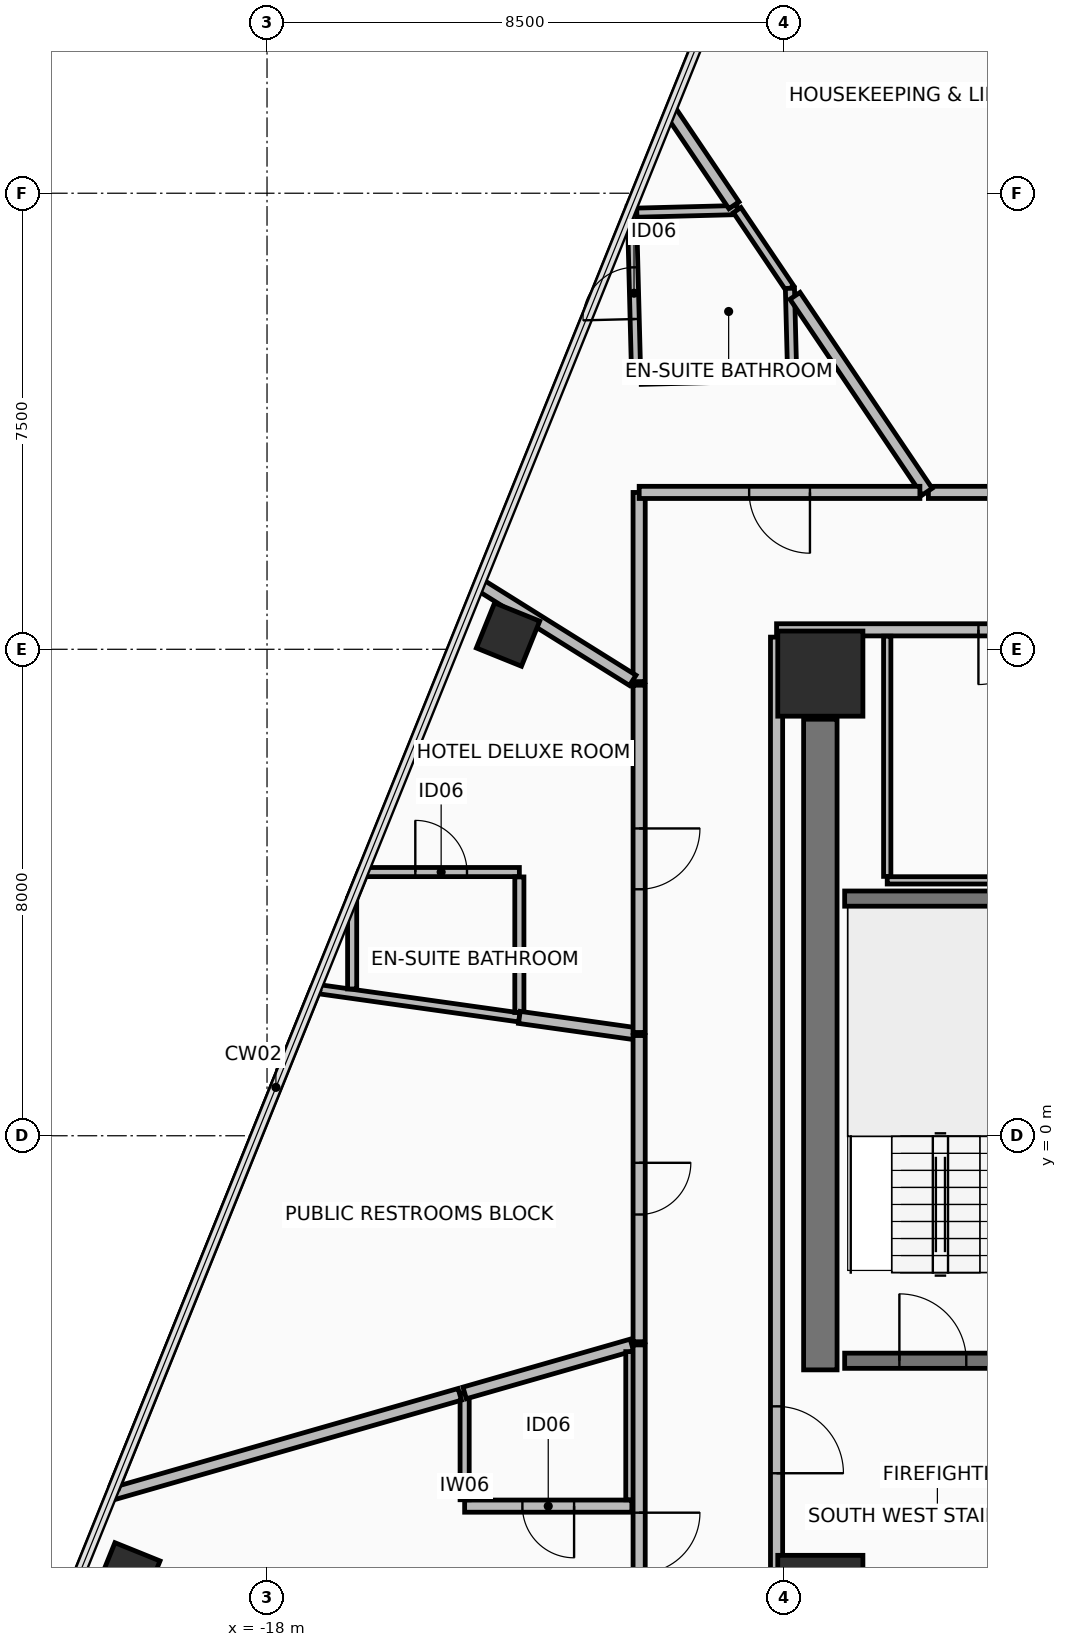
"""IFC4 building model, lengths in metres.
Left out: names, types, materials, properties, quantities, classifications, styles, units other than length and angle.
Written with IfcOpenShell. Run it as: python <this file> out.ifc"""

import sys

from ifc_helpers import new_model, si_unit, direction, frame, frame_2d, origin, origin_2d, place, context, subcontext, project, spatial, rectangle, hollow_rectangle, extrude, element, fill, save


model = new_model("IFC4")
c1 = context("Model", 3, precision=1e-05, world=origin(), true_north=direction((0.0, 1.0)))
c2 = subcontext(c1, "Body", "Model", "MODEL_VIEW")
j1 = project(units=[si_unit("LENGTHUNIT", "METRE"), si_unit("PLANEANGLEUNIT", "RADIAN")], contexts=[c1])
p1 = place(None, origin())
s1 = spatial("IfcSite", under=j1, at=p1, CompositionType="ELEMENT")
p2 = place(p1, origin())
s2 = spatial("IfcBuilding", under=s1, at=p2, CompositionType="ELEMENT")
p3 = place(p2, frame((0.0, 0.0, 60.45)))
s3 = spatial("IfcBuildingStorey", under=s2, at=p3, CompositionType="ELEMENT", Elevation=60.45)
for number, where, z_axis, x_axis in (
    (1, (-8.9, -7.6, 0.0), (0.0, 0.0, 1.0), (1.0, 0.0, 0.0)),
    (2, (-8.9, 7.6, 0.0), (0.0, 0.0, 1.0), (1.0, 0.0, 0.0)),
):
    element("IfcColumn", number, at=place(p3, frame(where, z_axis=z_axis, x_axis=x_axis)), inside=s3, PredefinedType="COLUMN", context=c2, shape_type="SweptSolid", body=[
        extrude(rectangle(XDim=1.4, YDim=1.4, at=origin_2d()), origin(), (0.0, 0.0, 1.0), 3.4),
    ])
for number, where, z_axis, x_axis in (
    (3, (-14.036, 8.242, 0.0), (0.0, 0.0, 1.0), (0.375, 0.927, 0.0)),
    (4, (-20.281, -7.213, 0.0), (0.0, 0.0, 1.0), (0.375, 0.927, 0.0)),
):
    element("IfcColumn", number, at=place(p3, frame(where, z_axis=z_axis, x_axis=x_axis)), inside=s3, PredefinedType="COLUMN", context=c2, shape_type="SweptSolid", body=[
        extrude(hollow_rectangle(XDim=0.8, YDim=0.8, WallThickness=0.045, at=origin_2d()), origin(), (0.0, 0.0, 1.0), 3.4),
    ])
p4 = place(p3, frame((-8.9, -3.85, 0.0), z_axis=(0.0, 0.0, 1.0), x_axis=(0.0, 1.0, 0.0)))
e5 = element("IfcWall", 5, at=p4, inside=s3, PredefinedType="SHEAR", context=c2, shape_type="SweptSolid", body=[
    extrude(rectangle(XDim=10.7, YDim=0.55, at=frame_2d((5.35, 0.0))), origin(), (0.0, 0.0, 1.0), 3.225),
])
p5 = place(p3, frame((9.62, 8.32, 0.0), z_axis=(0.0, 0.0, 1.0), x_axis=(-1.0, 0.0, 0.0)))
e6 = element("IfcWall", 6, at=p5, inside=s3, PredefinedType="PARTITIONING", context=c2, shape_type="SweptSolid", body=[
    extrude(rectangle(XDim=19.24, YDim=0.2, at=frame_2d((9.62, 0.0))), origin(), (0.0, 0.0, 1.0), 2.57),
])
p6 = place(p5, frame((15.02, 0.0, 0.0)))
e7 = element("IfcOpeningElement", 7, at=p6, cuts=e6, PredefinedType="OPENING", context=c2, shape_type="SweptSolid", body=[
    extrude(rectangle(XDim=0.9, YDim=2.1, at=frame_2d((0.45, 1.05))), frame((0.0, 0.11, 0.0), z_axis=(0.0, -1.0, 0.0), x_axis=(1.0, 0.0, 0.0)), (0.0, 0.0, 1.0), 0.22),
])
p7 = place(p3, frame((-9.62, 8.2, 0.0), z_axis=(0.0, 0.0, 1.0), x_axis=(0.0, -1.0, 0.0)))
e8 = element("IfcWall", 8, at=p7, inside=s3, PredefinedType="PARTITIONING", context=c2, shape_type="SweptSolid", body=[
    extrude(rectangle(XDim=16.4, YDim=0.2, at=frame_2d((8.2, 0.0))), origin(), (0.0, 0.0, 1.0), 2.62),
])
p8 = place(p7, frame((12.65, 0.0, 0.0)))
e9 = element("IfcOpeningElement", 9, at=p8, cuts=e8, PredefinedType="OPENING", context=c2, shape_type="SweptSolid", body=[
    extrude(rectangle(XDim=1.1, YDim=2.15, at=frame_2d((0.55, 1.075))), frame((0.0, 0.11, 0.0), z_axis=(0.0, -1.0, 0.0), x_axis=(1.0, 0.0, 0.0)), (0.0, 0.0, 1.0), 0.22),
])
p9 = place(p3, frame((-8.5, -3.7, 0.0), z_axis=(0.0, 0.0, 1.0), x_axis=(1.0, 0.0, 0.0)))
e10 = element("IfcWall", 10, at=p9, inside=s3, PredefinedType="SHEAR", context=c2, shape_type="SweptSolid", body=[
    extrude(rectangle(XDim=2.95, YDim=0.25, at=frame_2d((1.475, 0.0))), origin(), (0.0, 0.0, 1.0), 3.225),
])
p10 = place(p9, frame((0.9, 0.0, 0.0)))
e11 = element("IfcOpeningElement", 11, at=p10, cuts=e10, PredefinedType="OPENING", context=c2, shape_type="SweptSolid", body=[
    extrude(rectangle(XDim=1.1, YDim=2.15, at=frame_2d((0.55, 1.075))), frame((0.0, 0.135, 0.0), z_axis=(0.0, -1.0, 0.0), x_axis=(1.0, 0.0, 0.0)), (0.0, 0.0, 1.0), 0.27),
])
p11 = place(p3, frame((-8.5, 3.9, 0.0), z_axis=(0.0, 0.0, 1.0), x_axis=(1.0, 0.0, 0.0)))
e12 = element("IfcWall", 12, at=p11, inside=s3, PredefinedType="SHEAR", context=c2, shape_type="SweptSolid", body=[
    extrude(rectangle(XDim=2.95, YDim=0.25, at=frame_2d((1.475, 0.0))), origin(), (0.0, 0.0, 1.0), 3.225),
])
p12 = place(p3, frame((-7.8, 4.2, 0.0), z_axis=(0.0, 0.0, 1.0), x_axis=(1.0, 0.0, 0.0)))
e13 = element("IfcWall", 13, at=p12, inside=s3, PredefinedType="PARTITIONING", context=c2, shape_type="SweptSolid", body=[
    extrude(rectangle(XDim=3.9, YDim=0.12, at=frame_2d((1.95, 0.0))), origin(), (0.0, 0.0, 1.0), 3.225),
])
p13 = place(p3, frame((-7.8, 8.215, 0.0), z_axis=(0.0, 0.0, 1.0), x_axis=(0.0, -1.0, 0.0)))
e14 = element("IfcWall", 14, at=p13, inside=s3, PredefinedType="PARTITIONING", context=c2, shape_type="SweptSolid", body=[
    extrude(rectangle(XDim=3.95, YDim=0.12, at=frame_2d((1.975, 0.0))), origin(), (0.0, 0.0, 1.0), 2.42),
])
p14 = place(p3, frame((-11.927, 12.429, 0.0), z_axis=(0.0, 0.0, 1.0), x_axis=(-0.025753181092, 0.99966833183, 0.0)))
e15 = element("IfcWall", 15, at=p14, inside=s3, PredefinedType="PARTITIONING", context=c2, shape_type="SweptSolid", body=[
    extrude(rectangle(XDim=2.854, YDim=0.15, at=frame_2d((1.427, 0.0))), origin(), (0.0, 0.0, 1.0), 2.42),
])
p15 = place(p14, frame((1.002, 0.0, 0.0)))
e16 = element("IfcOpeningElement", 16, at=p15, cuts=e15, PredefinedType="OPENING", context=c2, shape_type="SweptSolid", body=[
    extrude(rectangle(XDim=0.85, YDim=2.1, at=frame_2d((0.425, 1.05))), frame((0.0, 0.085, 0.0), z_axis=(0.0, -1.0, 0.0), x_axis=(1.0, 0.0, 0.0)), (0.0, 0.0, 1.0), 0.17),
])
p16 = place(p3, frame((-11.918, 15.18, 0.0), z_axis=(0.0, 0.0, 1.0), x_axis=(0.999668899852, 0.02573112257, 0.0)))
e17 = element("IfcWall", 17, at=p16, inside=s3, PredefinedType="PARTITIONING", context=c2, shape_type="SweptSolid", body=[
    extrude(rectangle(XDim=1.651, YDim=0.15, at=frame_2d((0.825, 0.0))), origin(), (0.0, 0.0, 1.0), 2.42),
])
p17 = place(p3, frame((-10.268, 15.223, 0.0), z_axis=(0.0, 0.0, 1.0), x_axis=(0.559229675695, -0.82901276819, 0.0)))
e18 = element("IfcWall", 18, at=p17, inside=s3, PredefinedType="PARTITIONING", context=c2, shape_type="SweptSolid", body=[
    extrude(rectangle(XDim=1.552, YDim=0.15, at=frame_2d((0.776, 0.0))), origin(), (0.0, 0.0, 1.0), 3.225),
])
p18 = place(p3, frame((-9.4, 13.936, 0.0), z_axis=(0.0, 0.0, 1.0), x_axis=(0.025745445057, -0.999668531094, 0.0)))
e19 = element("IfcWall", 19, at=p18, inside=s3, PredefinedType="PARTITIONING", context=c2, shape_type="SweptSolid", body=[
    extrude(rectangle(XDim=1.441, YDim=0.15, at=frame_2d((0.721, 0.0))), origin(), (0.0, 0.0, 1.0), 3.225),
])
p19 = place(p3, frame((-9.443, 12.493, 0.0), z_axis=(0.0, 0.0, 1.0), x_axis=(-0.999667618691, -0.025780848324, 0.0)))
e20 = element("IfcWall", 20, at=p19, inside=s3, PredefinedType="PARTITIONING", context=c2, shape_type="SweptSolid", body=[
    extrude(rectangle(XDim=2.405, YDim=0.15, at=frame_2d((1.203, 0.0))), origin(), (0.0, 0.0, 1.0), 3.225),
])
p20 = place(p3, frame((-13.85, 1.947, 0.0), z_axis=(0.0, 0.0, 1.0), x_axis=(-0.99026466636, 0.139197308016, 0.0)))
e21 = element("IfcWall", 21, at=p20, inside=s3, PredefinedType="PARTITIONING", context=c2, shape_type="SweptSolid", body=[
    extrude(rectangle(XDim=3.382, YDim=0.15, at=frame_2d((1.691, 0.0))), origin(), (0.0, 0.0, 1.0), 2.42),
])
p21 = place(p3, frame((-16.6, 2.414, 0.0), z_axis=(0.0, 0.0, 1.0), x_axis=(0.0, 1.0, 0.0)))
e22 = element("IfcWall", 22, at=p21, inside=s3, PredefinedType="PARTITIONING", context=c2, shape_type="SweptSolid", body=[
    extrude(rectangle(XDim=1.485, YDim=0.15, at=frame_2d((0.743, 0.0))), origin(), (0.0, 0.0, 1.0), 2.42),
])
p22 = place(p3, frame((-16.6, 3.899, 0.0), z_axis=(0.0, 0.0, 1.0), x_axis=(0.374779708699, 0.927113892652, 0.0)))
e23 = element("IfcWall", 23, at=p22, inside=s3, PredefinedType="PARTITIONING", context=c2, shape_type="SweptSolid", body=[
    extrude(rectangle(XDim=0.472, YDim=0.15, at=frame_2d((0.236, 0.0))), origin(), (0.0, 0.0, 1.0), 3.225),
])
p23 = place(p3, frame((-16.423, 4.336, 0.0), z_axis=(0.0, 0.0, 1.0), x_axis=(1.0, 0.0, 0.0)))
e24 = element("IfcWall", 24, at=p23, inside=s3, PredefinedType="PARTITIONING", context=c2, shape_type="SweptSolid", body=[
    extrude(rectangle(XDim=2.573, YDim=0.15, at=frame_2d((1.287, 0.0))), origin(), (0.0, 0.0, 1.0), 2.42),
])
p24 = place(p23, frame((0.862, 0.0, 0.0)))
e25 = element("IfcOpeningElement", 25, at=p24, cuts=e24, PredefinedType="OPENING", context=c2, shape_type="SweptSolid", body=[
    extrude(rectangle(XDim=0.85, YDim=2.1, at=frame_2d((0.425, 1.05))), frame((0.0, 0.085, 0.0), z_axis=(0.0, -1.0, 0.0), x_axis=(1.0, 0.0, 0.0)), (0.0, 0.0, 1.0), 0.17),
])
p25 = place(p3, frame((-13.85, 4.257, 0.0), z_axis=(0.0, 0.0, 1.0), x_axis=(0.0, -1.0, 0.0)))
e26 = element("IfcWall", 26, at=p25, inside=s3, PredefinedType="PARTITIONING", context=c2, shape_type="SweptSolid", body=[
    extrude(rectangle(XDim=2.229, YDim=0.15, at=frame_2d((1.115, 0.0))), origin(), (0.0, 0.0, 1.0), 3.225),
])
p26 = place(p3, frame((-12.0, -6.091, 0.0), z_axis=(0.0, 0.0, 1.0), x_axis=(-1.0, 0.0, 0.0)))
e27 = element("IfcWall", 27, at=p26, inside=s3, PredefinedType="PARTITIONING", context=c2, shape_type="SweptSolid", body=[
    extrude(rectangle(XDim=2.75, YDim=0.2, at=frame_2d((1.375, 0.0))), origin(), (0.0, 0.0, 1.0), 2.82),
])
p27 = place(p26, frame((0.95, 0.0, 0.0)))
e28 = element("IfcOpeningElement", 28, at=p27, cuts=e27, PredefinedType="OPENING", context=c2, shape_type="SweptSolid", body=[
    extrude(rectangle(XDim=0.85, YDim=2.1, at=frame_2d((0.425, 1.05))), frame((0.0, 0.11, 0.0), z_axis=(0.0, -1.0, 0.0), x_axis=(1.0, 0.0, 0.0)), (0.0, 0.0, 1.0), 0.22),
])
p28 = place(p3, frame((-14.75, -5.986, 0.0), z_axis=(0.0, 0.0, 1.0), x_axis=(0.0, 1.0, 0.0)))
e29 = element("IfcWall", 29, at=p28, inside=s3, PredefinedType="PARTITIONING", context=c2, shape_type="SweptSolid", body=[
    extrude(rectangle(XDim=1.756, YDim=0.15, at=frame_2d((0.878, 0.0))), origin(), (0.0, 0.0, 1.0), 2.82),
])
p29 = place(p3, frame((-14.75, -4.229, 0.0), z_axis=(0.0, 0.0, 1.0), x_axis=(0.961259435334, 0.275645239358, 0.0)))
e30 = element("IfcWall", 30, at=p29, inside=s3, PredefinedType="PARTITIONING", context=c2, shape_type="SweptSolid", body=[
    extrude(rectangle(XDim=2.861, YDim=0.2, at=frame_2d((1.43, 0.0))), origin(), (0.0, 0.0, 1.0), 2.82),
])
p30 = place(p3, frame((-12.0, -3.55, 0.0), z_axis=(0.0, 0.0, 1.0), x_axis=(0.0, -1.0, 0.0)))
e31 = element("IfcWall", 31, at=p30, inside=s3, PredefinedType="PARTITIONING", context=c2, shape_type="SweptSolid", body=[
    extrude(rectangle(XDim=2.436, YDim=0.2, at=frame_2d((1.218, 0.0))), origin(), (0.0, 0.0, 1.0), 3.225),
])
p31 = place(p3, frame((-13.85, 1.947, 0.0), z_axis=(0.0, 0.0, 1.0), x_axis=(0.990262192263, -0.139214907871, 0.0)))
e32 = element("IfcWall", 32, at=p31, inside=s3, PredefinedType="PARTITIONING", context=c2, shape_type="SweptSolid", body=[
    extrude(rectangle(XDim=1.968, YDim=0.2, at=frame_2d((0.984, 0.0))), origin(), (0.0, 0.0, 1.0), 2.82),
])
p32 = place(p3, frame((-11.88, 1.648, 0.0), z_axis=(0.0, 0.0, 1.0), x_axis=(0.0, -1.0, 0.0)))
e33 = element("IfcWall", 33, at=p32, inside=s3, PredefinedType="PARTITIONING", context=c2, shape_type="SweptSolid", body=[
    extrude(rectangle(XDim=5.036, YDim=0.2, at=frame_2d((2.518, 0.0))), origin(), (0.0, 0.0, 1.0), 3.225),
])
p33 = place(p32, frame((2.093, 0.0, 0.0)))
e34 = element("IfcOpeningElement", 34, at=p33, cuts=e33, PredefinedType="OPENING", context=c2, shape_type="SweptSolid", body=[
    extrude(rectangle(XDim=0.85, YDim=2.1, at=frame_2d((0.425, 1.05))), frame((0.0, 0.11, 0.0), z_axis=(0.0, -1.0, 0.0), x_axis=(1.0, 0.0, 0.0)), (0.0, 0.0, 1.0), 0.22),
])
p34 = place(p3, frame((-14.83, -4.252, 0.0), z_axis=(0.0, 0.0, 1.0), x_axis=(-0.961263721078, -0.275630293216, 0.0)))
e35 = element("IfcWall", 35, at=p34, inside=s3, PredefinedType="PARTITIONING", context=c2, shape_type="SweptSolid", body=[
    extrude(rectangle(XDim=5.958, YDim=0.2, at=frame_2d((2.979, 0.0))), origin(), (0.0, 0.0, 1.0), 2.42),
])
p35 = place(p3, frame((-20.507, -5.771, 0.0), z_axis=(0.0, 0.0, 1.0), x_axis=(0.374622465586, 0.927177441636, 0.0)))
e36 = element("IfcWall", 36, at=p35, inside=s3, PredefinedType="PARTITIONING", context=c2, shape_type="SweptSolid", body=[
    extrude(rectangle(XDim=8.812, YDim=0.15, at=frame_2d((4.406, 0.0))), origin(), (0.0, 0.0, 1.0), 3.225),
])
p36 = place(p3, frame((-1.895, 10.58, 0.0), z_axis=(0.0, 0.0, 1.0), x_axis=(-1.0, 0.0, 0.0)))
e37 = element("IfcWall", 37, at=p36, inside=s3, PredefinedType="PARTITIONING", context=c2, shape_type="SweptSolid", body=[
    extrude(rectangle(XDim=5.228, YDim=0.2, at=frame_2d((2.614, 0.0))), origin(), (0.0, 0.0, 1.0), 3.225),
])
p37 = place(p36, frame((2.164, 0.0, 0.0)))
e38 = element("IfcOpeningElement", 38, at=p37, cuts=e37, PredefinedType="OPENING", context=c2, shape_type="SweptSolid", body=[
    extrude(rectangle(XDim=0.9, YDim=2.1, at=frame_2d((0.45, 1.05))), frame((0.0, 0.11, 0.0), z_axis=(0.0, -1.0, 0.0), x_axis=(1.0, 0.0, 0.0)), (0.0, 0.0, 1.0), 0.22),
])
p38 = place(p3, frame((-7.144, 10.591, 0.0), z_axis=(0.0, 0.0, 1.0), x_axis=(-0.559171794076, 0.829051810631, 0.0)))
e39 = element("IfcWall", 39, at=p38, inside=s3, PredefinedType="PARTITIONING", context=c2, shape_type="SweptSolid", body=[
    extrude(rectangle(XDim=3.886, YDim=0.2, at=frame_2d((1.943, 0.0))), origin(), (0.0, 0.0, 1.0), 2.57),
])
p39 = place(p3, frame((-10.321, 15.302, 0.0), z_axis=(0.0, 0.0, 1.0), x_axis=(-0.559274091042, 0.828982805062, 0.0)))
e40 = element("IfcWall", 40, at=p39, inside=s3, PredefinedType="PARTITIONING", context=c2, shape_type="SweptSolid", body=[
    extrude(rectangle(XDim=1.857, YDim=0.2, at=frame_2d((0.928, 0.0))), origin(), (0.0, 0.0, 1.0), 2.42),
])
p40 = place(p3, frame((-11.88, 10.579, 0.0), z_axis=(0.0, 0.0, 1.0), x_axis=(0.0, -1.0, 0.0)))
e41 = element("IfcWall", 41, at=p40, inside=s3, PredefinedType="PARTITIONING", context=c2, shape_type="SweptSolid", body=[
    extrude(rectangle(XDim=3.111, YDim=0.2, at=frame_2d((1.555, 0.0))), origin(), (0.0, 0.0, 1.0), 2.62),
])
p41 = place(p3, frame((-11.985, 7.489, 0.0), z_axis=(0.0, 0.0, 1.0), x_axis=(-0.84801684821, 0.52996926812, 0.0)))
e42 = element("IfcWall", 42, at=p41, inside=s3, PredefinedType="PARTITIONING", context=c2, shape_type="SweptSolid", body=[
    extrude(rectangle(XDim=2.958, YDim=0.2, at=frame_2d((1.479, 0.0))), origin(), (0.0, 0.0, 1.0), 2.42),
])
p42 = place(p3, frame((-7.263, 10.58, 0.0), z_axis=(0.0, 0.0, 1.0), x_axis=(-1.0, 0.0, 0.0)))
e43 = element("IfcWall", 43, at=p42, inside=s3, PredefinedType="PARTITIONING", context=c2, shape_type="SweptSolid", body=[
    extrude(rectangle(XDim=4.616, YDim=0.2, at=frame_2d((2.308, 0.0))), origin(), (0.0, 0.0, 1.0), 2.57),
])
p43 = place(p42, frame((1.808, 0.0, 0.0)))
e44 = element("IfcOpeningElement", 44, at=p43, cuts=e43, PredefinedType="OPENING", context=c2, shape_type="SweptSolid", body=[
    extrude(rectangle(XDim=1.0, YDim=2.15, at=frame_2d((0.5, 1.075))), frame((0.0, 0.11, 0.0), z_axis=(0.0, -1.0, 0.0), x_axis=(1.0, 0.0, 0.0)), (0.0, 0.0, 1.0), 0.22),
])
p44 = place(p3, frame((-11.88, 7.41, 0.0), z_axis=(0.0, 0.0, 1.0), x_axis=(0.0, -1.0, 0.0)))
e45 = element("IfcWall", 45, at=p44, inside=s3, PredefinedType="PARTITIONING", context=c2, shape_type="SweptSolid", body=[
    extrude(rectangle(XDim=5.711, YDim=0.2, at=frame_2d((2.855, 0.0))), origin(), (0.0, 0.0, 1.0), 2.82),
])
p45 = place(p44, frame((2.356, 0.0, 0.0)))
e46 = element("IfcOpeningElement", 46, at=p45, cuts=e45, PredefinedType="OPENING", context=c2, shape_type="SweptSolid", body=[
    extrude(rectangle(XDim=1.0, YDim=2.15, at=frame_2d((0.5, 1.075))), frame((0.0, 0.11, 0.0), z_axis=(0.0, -1.0, 0.0), x_axis=(1.0, 0.0, 0.0)), (0.0, 0.0, 1.0), 0.22),
])
p46 = place(p3, frame((-11.88, -3.44, 0.0), z_axis=(0.0, 0.0, 1.0), x_axis=(0.0, -1.0, 0.0)))
e47 = element("IfcWall", 47, at=p46, inside=s3, PredefinedType="PARTITIONING", context=c2, shape_type="SweptSolid", body=[
    extrude(rectangle(XDim=6.517, YDim=0.2, at=frame_2d((3.259, 0.0))), origin(), (0.0, 0.0, 1.0), 2.62),
])
p47 = place(p46, frame((2.759, 0.0, 0.0)))
e48 = element("IfcOpeningElement", 48, at=p47, cuts=e47, PredefinedType="OPENING", context=c2, shape_type="SweptSolid", body=[
    extrude(rectangle(XDim=1.0, YDim=2.15, at=frame_2d((0.5, 1.075))), frame((0.0, 0.11, 0.0), z_axis=(0.0, -1.0, 0.0), x_axis=(1.0, 0.0, 0.0)), (0.0, 0.0, 1.0), 0.22),
])
p48 = place(p8, frame((1.1, 0.0, 0.0), z_axis=(0.0, 0.0, 1.0), x_axis=(-1.0, 0.0, 0.0)))
e49 = element("IfcDoor", 49, at=p48, inside=s3, OperationType="SINGLE_SWING_LEFT", PredefinedType="DOOR", context=c2, shape_type="SweptSolid", body=[
    extrude(rectangle(XDim=1.1, YDim=2.15, at=frame_2d((0.55, 1.075))), frame((0.0, 0.025, 0.0), z_axis=(0.0, -1.0, 0.0), x_axis=(1.0, 0.0, 0.0)), (0.0, 0.0, 1.0), 0.05),
])
fill(e9, e49)
p49 = place(p10, origin())
e50 = element("IfcDoor", 50, at=p49, inside=s3, OperationType="SINGLE_SWING_LEFT", PredefinedType="DOOR", context=c2, shape_type="SweptSolid", body=[
    extrude(rectangle(XDim=1.1, YDim=2.15, at=frame_2d((0.55, 1.075))), frame((0.0, 0.025, 0.0), z_axis=(0.0, -1.0, 0.0), x_axis=(1.0, 0.0, 0.0)), (0.0, 0.0, 1.0), 0.05),
])
fill(e11, e50)
p50 = place(p6, frame((0.9, 0.0, 0.0), z_axis=(0.0, 0.0, 1.0), x_axis=(-1.0, 0.0, 0.0)))
e51 = element("IfcDoor", 51, at=p50, inside=s3, OperationType="SINGLE_SWING_LEFT", PredefinedType="DOOR", context=c2, shape_type="SweptSolid", body=[
    extrude(rectangle(XDim=0.9, YDim=2.1, at=frame_2d((0.45, 1.05))), frame((0.0, 0.025, 0.0), z_axis=(0.0, -1.0, 0.0), x_axis=(1.0, 0.0, 0.0)), (0.0, 0.0, 1.0), 0.05),
])
fill(e7, e51)
p51 = place(p15, origin())
e52 = element("IfcDoor", 52, at=p51, inside=s3, OperationType="SINGLE_SWING_RIGHT", PredefinedType="DOOR", context=c2, shape_type="SweptSolid", body=[
    extrude(rectangle(XDim=0.85, YDim=2.1, at=frame_2d((0.425, 1.05))), frame((0.0, 0.025, 0.0), z_axis=(0.0, -1.0, 0.0), x_axis=(1.0, 0.0, 0.0)), (0.0, 0.0, 1.0), 0.05),
])
fill(e16, e52)
p52 = place(p24, origin())
e53 = element("IfcDoor", 53, at=p52, inside=s3, OperationType="SINGLE_SWING_RIGHT", PredefinedType="DOOR", context=c2, shape_type="SweptSolid", body=[
    extrude(rectangle(XDim=0.85, YDim=2.1, at=frame_2d((0.425, 1.05))), frame((0.0, 0.025, 0.0), z_axis=(0.0, -1.0, 0.0), x_axis=(1.0, 0.0, 0.0)), (0.0, 0.0, 1.0), 0.05),
])
fill(e25, e53)
p53 = place(p27, origin())
e54 = element("IfcDoor", 54, at=p53, inside=s3, OperationType="SINGLE_SWING_RIGHT", PredefinedType="DOOR", context=c2, shape_type="SweptSolid", body=[
    extrude(rectangle(XDim=0.85, YDim=2.1, at=frame_2d((0.425, 1.05))), frame((0.0, 0.025, 0.0), z_axis=(0.0, -1.0, 0.0), x_axis=(1.0, 0.0, 0.0)), (0.0, 0.0, 1.0), 0.05),
])
fill(e28, e54)
p54 = place(p33, origin())
e55 = element("IfcDoor", 55, at=p54, inside=s3, OperationType="SINGLE_SWING_RIGHT", PredefinedType="DOOR", context=c2, shape_type="SweptSolid", body=[
    extrude(rectangle(XDim=0.85, YDim=2.1, at=frame_2d((0.425, 1.05))), frame((0.0, 0.025, 0.0), z_axis=(0.0, -1.0, 0.0), x_axis=(1.0, 0.0, 0.0)), (0.0, 0.0, 1.0), 0.05),
])
fill(e34, e55)
p55 = place(p43, origin())
e56 = element("IfcDoor", 56, at=p55, inside=s3, OperationType="SINGLE_SWING_LEFT", PredefinedType="DOOR", context=c2, shape_type="SweptSolid", body=[
    extrude(rectangle(XDim=1.0, YDim=2.15, at=frame_2d((0.5, 1.075))), frame((0.0, 0.025, 0.0), z_axis=(0.0, -1.0, 0.0), x_axis=(1.0, 0.0, 0.0)), (0.0, 0.0, 1.0), 0.05),
])
fill(e44, e56)
p56 = place(p45, origin())
e57 = element("IfcDoor", 57, at=p56, inside=s3, OperationType="SINGLE_SWING_LEFT", PredefinedType="DOOR", context=c2, shape_type="SweptSolid", body=[
    extrude(rectangle(XDim=1.0, YDim=2.15, at=frame_2d((0.5, 1.075))), frame((0.0, 0.025, 0.0), z_axis=(0.0, -1.0, 0.0), x_axis=(1.0, 0.0, 0.0)), (0.0, 0.0, 1.0), 0.05),
])
fill(e46, e57)
p57 = place(p47, origin())
e58 = element("IfcDoor", 58, at=p57, inside=s3, OperationType="SINGLE_SWING_LEFT", PredefinedType="DOOR", context=c2, shape_type="SweptSolid", body=[
    extrude(rectangle(XDim=1.0, YDim=2.15, at=frame_2d((0.5, 1.075))), frame((0.0, 0.025, 0.0), z_axis=(0.0, -1.0, 0.0), x_axis=(1.0, 0.0, 0.0)), (0.0, 0.0, 1.0), 0.05),
])
fill(e48, e58)
save(model, sys.argv[1])
